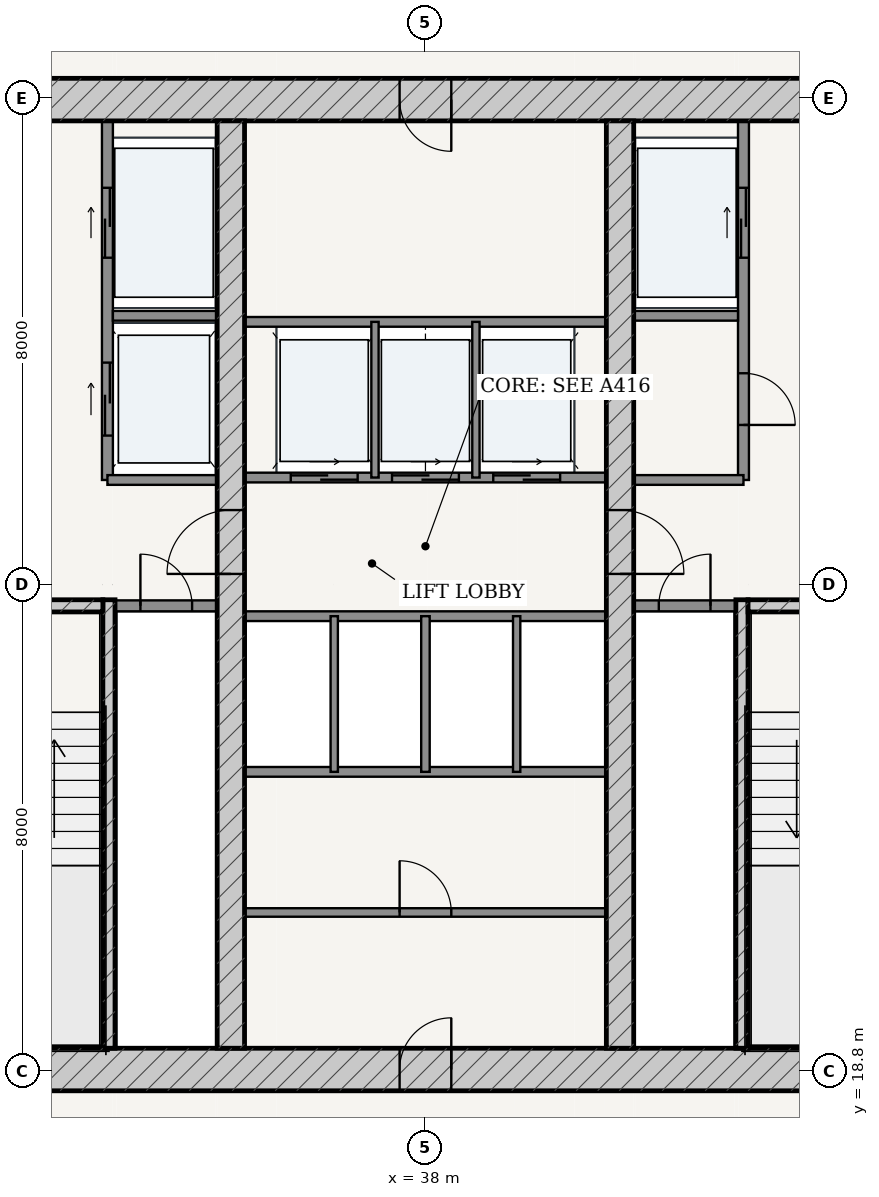
"""IFC4 building model, lengths in metres.
Left out: names, types, materials, properties, quantities, classifications, styles, units other than length and angle.
Written with IfcOpenShell. Run it as: python <this file> out.ifc"""

import sys

from ifc_helpers import new_model, si_unit, direction, frame, frame_2d, origin, place, context, subcontext, project, spatial, rectangle, extrude, source, transform, mapped, element, fill, save


model = new_model("IFC4")
c1 = context("Model", 3, precision=1e-05, world=origin(), true_north=direction((-0.2419218956, 0.970295726276)))
c2 = subcontext(c1, "Body", "Model", "MODEL_VIEW")
j1 = project(units=[si_unit("LENGTHUNIT", "METRE"), si_unit("PLANEANGLEUNIT", "RADIAN")], contexts=[c1])
p1 = place(None, origin())
s1 = spatial("IfcSite", under=j1, at=p1, CompositionType="ELEMENT")
p2 = place(p1, origin())
s2 = spatial("IfcBuilding", under=s1, at=p2, CompositionType="ELEMENT")
p3 = place(p2, frame((0.0, 0.0, 97.8)))
s3 = spatial("IfcBuildingStorey", under=s2, at=p3, CompositionType="ELEMENT", Elevation=97.8)
p4 = place(p3, frame((28.675, 18.825, 0.0), z_axis=(0.0, 0.0, 1.0), x_axis=(1.0, 0.0, 0.0)))
e1 = element("IfcWall", 1, at=p4, inside=s3, PredefinedType="SHEAR", context=c2, shape_type="SweptSolid", body=[
    extrude(rectangle(XDim=18.65, YDim=0.7, at=frame_2d((9.325, 0.0))), origin(), (0.0, 0.0, 1.0), 3.325),
])
p5 = place(p4, frame((8.9, 0.0, 0.0)))
e2 = element("IfcOpeningElement", 2, at=p5, cuts=e1, PredefinedType="OPENING", context=c2, shape_type="SweptSolid", body=[
    extrude(rectangle(XDim=0.85, YDim=2.1, at=frame_2d((0.425, 1.05))), frame((0.0, 0.36, 0.0), z_axis=(0.0, -1.0, 0.0), x_axis=(1.0, 0.0, 0.0)), (0.0, 0.0, 1.0), 0.72),
])
p6 = place(p3, frame((28.675, 34.775, 0.0), z_axis=(0.0, 0.0, 1.0), x_axis=(1.0, 0.0, 0.0)))
e3 = element("IfcWall", 3, at=p6, inside=s3, PredefinedType="SHEAR", context=c2, shape_type="SweptSolid", body=[
    extrude(rectangle(XDim=18.65, YDim=0.7, at=frame_2d((9.325, 0.0))), origin(), (0.0, 0.0, 1.0), 3.325),
])
p7 = place(p6, frame((8.9, 0.0, 0.0)))
e4 = element("IfcOpeningElement", 4, at=p7, cuts=e3, PredefinedType="OPENING", context=c2, shape_type="SweptSolid", body=[
    extrude(rectangle(XDim=0.85, YDim=2.1, at=frame_2d((0.425, 1.05))), frame((0.0, 0.36, 0.0), z_axis=(0.0, -1.0, 0.0), x_axis=(1.0, 0.0, 0.0)), (0.0, 0.0, 1.0), 0.72),
])
p8 = place(p3, frame((32.795, 19.175, 0.0), z_axis=(0.0, 0.0, 1.0), x_axis=(0.0, 1.0, 0.0)))
e5 = element("IfcWall", 5, at=p8, inside=s3, PredefinedType="SOLIDWALL", context=c2, shape_type="SweptSolid", body=[
    extrude(rectangle(XDim=7.375, YDim=0.2, at=frame_2d((3.688, 0.0))), origin(), (0.0, 0.0, 1.0), 3.325),
])
p9 = place(p3, frame((29.375, 26.45, 0.0), z_axis=(0.0, 0.0, 1.0), x_axis=(1.0, 0.0, 0.0)))
e6 = element("IfcWall", 6, at=p9, inside=s3, PredefinedType="SOLIDWALL", context=c2, shape_type="SweptSolid", body=[
    extrude(rectangle(XDim=3.32, YDim=0.2, at=frame_2d((1.66, 0.0))), origin(), (0.0, 0.0, 1.0), 3.325),
])
p10 = place(p9, frame((1.185, 0.0, 0.0)))
e7 = element("IfcOpeningElement", 7, at=p10, cuts=e6, PredefinedType="OPENING", context=c2, shape_type="SweptSolid", body=[
    extrude(rectangle(XDim=0.95, YDim=2.15, at=frame_2d((0.475, 1.075))), frame((0.0, 0.11, 0.0), z_axis=(0.0, -1.0, 0.0), x_axis=(1.0, 0.0, 0.0)), (0.0, 0.0, 1.0), 0.22),
])
p11 = place(p3, frame((43.205, 19.175, 0.0), z_axis=(0.0, 0.0, 1.0), x_axis=(0.0, 1.0, 0.0)))
e8 = element("IfcWall", 8, at=p11, inside=s3, PredefinedType="SOLIDWALL", context=c2, shape_type="SweptSolid", body=[
    extrude(rectangle(XDim=7.375, YDim=0.2, at=frame_2d((3.688, 0.0))), origin(), (0.0, 0.0, 1.0), 3.325),
])
p12 = place(p3, frame((43.305, 26.45, 0.0), z_axis=(0.0, 0.0, 1.0), x_axis=(1.0, 0.0, 0.0)))
e9 = element("IfcWall", 9, at=p12, inside=s3, PredefinedType="SOLIDWALL", context=c2, shape_type="SweptSolid", body=[
    extrude(rectangle(XDim=3.32, YDim=0.2, at=frame_2d((1.66, 0.0))), origin(), (0.0, 0.0, 1.0), 3.325),
])
p13 = place(p12, frame((1.185, 0.0, 0.0)))
e10 = element("IfcOpeningElement", 10, at=p13, cuts=e9, PredefinedType="OPENING", context=c2, shape_type="SweptSolid", body=[
    extrude(rectangle(XDim=0.95, YDim=2.15, at=frame_2d((0.475, 1.075))), frame((0.0, 0.11, 0.0), z_axis=(0.0, -1.0, 0.0), x_axis=(1.0, 0.0, 0.0)), (0.0, 0.0, 1.0), 0.22),
])
p14 = place(p3, frame((34.8, 19.175, 0.0), z_axis=(0.0, 0.0, 1.0), x_axis=(0.0, 1.0, 0.0)))
e11 = element("IfcWall", 11, at=p14, inside=s3, PredefinedType="SHEAR", context=c2, shape_type="SweptSolid", body=[
    extrude(rectangle(XDim=15.25, YDim=0.45, at=frame_2d((7.625, 0.0))), origin(), (0.0, 0.0, 1.0), 3.325),
])
p15 = place(p14, frame((7.8, 0.0, 0.0)))
e12 = element("IfcOpeningElement", 12, at=p15, cuts=e11, PredefinedType="OPENING", context=c2, shape_type="SweptSolid", body=[
    extrude(rectangle(XDim=1.05, YDim=2.15, at=frame_2d((0.525, 1.075))), frame((0.0, 0.235, 0.0), z_axis=(0.0, -1.0, 0.0), x_axis=(1.0, 0.0, 0.0)), (0.0, 0.0, 1.0), 0.47),
])
p16 = place(p3, frame((41.2, 19.175, 0.0), z_axis=(0.0, 0.0, 1.0), x_axis=(0.0, 1.0, 0.0)))
e13 = element("IfcWall", 13, at=p16, inside=s3, PredefinedType="SHEAR", context=c2, shape_type="SweptSolid", body=[
    extrude(rectangle(XDim=15.25, YDim=0.45, at=frame_2d((7.625, 0.0))), origin(), (0.0, 0.0, 1.0), 3.325),
])
p17 = place(p16, frame((7.8, 0.0, 0.0)))
e14 = element("IfcOpeningElement", 14, at=p17, cuts=e13, PredefinedType="OPENING", context=c2, shape_type="SweptSolid", body=[
    extrude(rectangle(XDim=1.05, YDim=2.15, at=frame_2d((0.525, 1.075))), frame((0.0, 0.235, 0.0), z_axis=(0.0, -1.0, 0.0), x_axis=(1.0, 0.0, 0.0)), (0.0, 0.0, 1.0), 0.47),
])
p18 = place(p3, frame((32.9, 26.45, 0.0), z_axis=(0.0, 0.0, 1.0), x_axis=(1.0, 0.0, 0.0)))
e15 = element("IfcWall", 15, at=p18, inside=s3, PredefinedType="PARTITIONING", context=c2, shape_type="SweptSolid", body=[
    extrude(rectangle(XDim=1.675, YDim=0.18, at=frame_2d((0.837, 0.0))), origin(), (0.0, 0.0, 1.0), 3.325),
])
p19 = place(p18, frame((0.413, 0.0, 0.0)))
e16 = element("IfcOpeningElement", 16, at=p19, cuts=e15, PredefinedType="OPENING", context=c2, shape_type="SweptSolid", body=[
    extrude(rectangle(XDim=0.85, YDim=2.1, at=frame_2d((0.425, 1.05))), frame((0.0, 0.1, 0.0), z_axis=(0.0, -1.0, 0.0), x_axis=(1.0, 0.0, 0.0)), (0.0, 0.0, 1.0), 0.2),
])
p20 = place(p3, frame((41.425, 26.45, 0.0), z_axis=(0.0, 0.0, 1.0), x_axis=(1.0, 0.0, 0.0)))
e17 = element("IfcWall", 17, at=p20, inside=s3, PredefinedType="PARTITIONING", context=c2, shape_type="SweptSolid", body=[
    extrude(rectangle(XDim=1.675, YDim=0.18, at=frame_2d((0.837, 0.0))), origin(), (0.0, 0.0, 1.0), 3.325),
])
p21 = place(p20, frame((0.413, 0.0, 0.0)))
e18 = element("IfcOpeningElement", 18, at=p21, cuts=e17, PredefinedType="OPENING", context=c2, shape_type="SweptSolid", body=[
    extrude(rectangle(XDim=0.85, YDim=2.1, at=frame_2d((0.425, 1.05))), frame((0.0, 0.1, 0.0), z_axis=(0.0, -1.0, 0.0), x_axis=(1.0, 0.0, 0.0)), (0.0, 0.0, 1.0), 0.2),
])
p22 = place(p3, frame((32.77, 28.52, 0.0), z_axis=(0.0, 0.0, 1.0), x_axis=(0.0, 1.0, 0.0)))
e19 = element("IfcWall", 19, at=p22, inside=s3, PredefinedType="PARTITIONING", context=c2, shape_type="SweptSolid", body=[
    extrude(rectangle(XDim=5.905, YDim=0.18, at=frame_2d((2.953, 0.0))), origin(), (0.0, 0.0, 1.0), 3.325),
])
p23 = place(p22, frame((3.655, 0.0, 0.0)))
e20 = element("IfcOpeningElement", 20, at=p23, cuts=e19, PredefinedType="OPENING", context=c2, shape_type="SweptSolid", body=[
    extrude(rectangle(XDim=1.15, YDim=2.2, at=frame_2d((0.575, 1.1))), frame((0.0, 0.1, 0.0), z_axis=(0.0, -1.0, 0.0), x_axis=(1.0, 0.0, 0.0)), (0.0, 0.0, 1.0), 0.2),
])
p24 = place(p22, frame((0.73, 0.0, 0.0)))
e21 = element("IfcOpeningElement", 21, at=p24, cuts=e19, PredefinedType="OPENING", context=c2, shape_type="SweptSolid", body=[
    extrude(rectangle(XDim=1.2, YDim=2.25, at=frame_2d((0.6, 1.125))), frame((0.0, 0.1, 0.0), z_axis=(0.0, -1.0, 0.0), x_axis=(1.0, 0.0, 0.0)), (0.0, 0.0, 1.0), 0.2),
])
p25 = place(p3, frame((32.86, 31.22, 0.0), z_axis=(0.0, 0.0, 1.0), x_axis=(1.0, 0.0, 0.0)))
e22 = element("IfcWall", 22, at=p25, inside=s3, PredefinedType="PARTITIONING", context=c2, shape_type="SweptSolid", body=[
    extrude(rectangle(XDim=1.715, YDim=0.16, at=frame_2d((0.857, 0.0))), origin(), (0.0, 0.0, 1.0), 3.325),
])
p26 = place(p3, frame((32.77, 28.52, 0.0), z_axis=(0.0, 0.0, 1.0), x_axis=(1.0, 0.0, 0.0)))
e23 = element("IfcWall", 23, at=p26, inside=s3, PredefinedType="PARTITIONING", context=c2, shape_type="SweptSolid", body=[
    extrude(rectangle(XDim=1.805, YDim=0.16, at=frame_2d((0.902, 0.0))), origin(), (0.0, 0.0, 1.0), 3.325),
])
p27 = place(p3, frame((43.23, 28.52, 0.0), z_axis=(0.0, 0.0, 1.0), x_axis=(0.0, 1.0, 0.0)))
e24 = element("IfcWall", 24, at=p27, inside=s3, PredefinedType="PARTITIONING", context=c2, shape_type="SweptSolid", body=[
    extrude(rectangle(XDim=5.905, YDim=0.18, at=frame_2d((2.953, 0.0))), origin(), (0.0, 0.0, 1.0), 3.325),
])
p28 = place(p27, frame((0.905, 0.0, 0.0)))
e25 = element("IfcOpeningElement", 25, at=p28, cuts=e24, PredefinedType="OPENING", context=c2, shape_type="SweptSolid", body=[
    extrude(rectangle(XDim=0.85, YDim=2.1, at=frame_2d((0.425, 1.05))), frame((0.0, 0.1, 0.0), z_axis=(0.0, -1.0, 0.0), x_axis=(1.0, 0.0, 0.0)), (0.0, 0.0, 1.0), 0.2),
])
p29 = place(p27, frame((3.655, 0.0, 0.0)))
e26 = element("IfcOpeningElement", 26, at=p29, cuts=e24, PredefinedType="OPENING", context=c2, shape_type="SweptSolid", body=[
    extrude(rectangle(XDim=1.15, YDim=2.2, at=frame_2d((0.575, 1.1))), frame((0.0, 0.1, 0.0), z_axis=(0.0, -1.0, 0.0), x_axis=(1.0, 0.0, 0.0)), (0.0, 0.0, 1.0), 0.2),
])
p30 = place(p3, frame((41.425, 31.22, 0.0), z_axis=(0.0, 0.0, 1.0), x_axis=(1.0, 0.0, 0.0)))
e27 = element("IfcWall", 27, at=p30, inside=s3, PredefinedType="PARTITIONING", context=c2, shape_type="SweptSolid", body=[
    extrude(rectangle(XDim=1.715, YDim=0.16, at=frame_2d((0.857, 0.0))), origin(), (0.0, 0.0, 1.0), 3.325),
])
p31 = place(p3, frame((41.425, 28.52, 0.0), z_axis=(0.0, 0.0, 1.0), x_axis=(1.0, 0.0, 0.0)))
e28 = element("IfcWall", 28, at=p31, inside=s3, PredefinedType="PARTITIONING", context=c2, shape_type="SweptSolid", body=[
    extrude(rectangle(XDim=1.805, YDim=0.16, at=frame_2d((0.902, 0.0))), origin(), (0.0, 0.0, 1.0), 3.325),
])
p32 = place(p3, frame((35.025, 28.56, 0.0), z_axis=(0.0, 0.0, 1.0), x_axis=(1.0, 0.0, 0.0)))
e29 = element("IfcWall", 29, at=p32, inside=s3, PredefinedType="PARTITIONING", context=c2, shape_type="SweptSolid", body=[
    extrude(rectangle(XDim=5.95, YDim=0.16, at=frame_2d((2.975, 0.0))), origin(), (0.0, 0.0, 1.0), 3.325),
])
p33 = place(p32, frame((0.76, 0.0, 0.0)))
e30 = element("IfcOpeningElement", 30, at=p33, cuts=e29, PredefinedType="OPENING", context=c2, shape_type="SweptSolid", body=[
    extrude(rectangle(XDim=1.1, YDim=2.2, at=frame_2d((0.55, 1.1))), frame((0.0, 0.09, 0.0), z_axis=(0.0, -1.0, 0.0), x_axis=(1.0, 0.0, 0.0)), (0.0, 0.0, 1.0), 0.18),
])
p34 = place(p32, frame((2.425, 0.0, 0.0)))
e31 = element("IfcOpeningElement", 31, at=p34, cuts=e29, PredefinedType="OPENING", context=c2, shape_type="SweptSolid", body=[
    extrude(rectangle(XDim=1.1, YDim=2.2, at=frame_2d((0.55, 1.1))), frame((0.0, 0.09, 0.0), z_axis=(0.0, -1.0, 0.0), x_axis=(1.0, 0.0, 0.0)), (0.0, 0.0, 1.0), 0.18),
])
p35 = place(p32, frame((4.09, 0.0, 0.0)))
e32 = element("IfcOpeningElement", 32, at=p35, cuts=e29, PredefinedType="OPENING", context=c2, shape_type="SweptSolid", body=[
    extrude(rectangle(XDim=1.1, YDim=2.2, at=frame_2d((0.55, 1.1))), frame((0.0, 0.09, 0.0), z_axis=(0.0, -1.0, 0.0), x_axis=(1.0, 0.0, 0.0)), (0.0, 0.0, 1.0), 0.18),
])
p36 = place(p3, frame((35.025, 31.12, 0.0), z_axis=(0.0, 0.0, 1.0), x_axis=(1.0, 0.0, 0.0)))
e33 = element("IfcWall", 33, at=p36, inside=s3, PredefinedType="PARTITIONING", context=c2, shape_type="SweptSolid", body=[
    extrude(rectangle(XDim=5.95, YDim=0.16, at=frame_2d((2.975, 0.0))), origin(), (0.0, 0.0, 1.0), 3.325),
])
for number, where, z_axis, x_axis in (
    (34, (37.17, 28.56, 0.0), (0.0, 0.0, 1.0), (0.0, 1.0, 0.0)),
    (35, (38.83, 28.56, 0.0), (0.0, 0.0, 1.0), (0.0, 1.0, 0.0)),
):
    element("IfcWall", number, at=place(p3, frame(where, z_axis=z_axis, x_axis=x_axis)), inside=s3, PredefinedType="PARTITIONING", context=c2, shape_type="SweptSolid", body=[
        extrude(rectangle(XDim=2.56, YDim=0.12, at=frame_2d((1.28, 0.0))), origin(), (0.0, 0.0, 1.0), 3.325),
    ])
for number, where, z_axis, x_axis in (
    (36, (35.025, 26.28, 0.0), (0.0, 0.0, 1.0), (1.0, 0.0, 0.0)),
    (37, (35.025, 23.72, 0.0), (0.0, 0.0, 1.0), (1.0, 0.0, 0.0)),
):
    element("IfcWall", number, at=place(p3, frame(where, z_axis=z_axis, x_axis=x_axis)), inside=s3, PredefinedType="PARTITIONING", context=c2, shape_type="SweptSolid", body=[
        extrude(rectangle(XDim=5.95, YDim=0.16, at=frame_2d((2.975, 0.0))), origin(), (0.0, 0.0, 1.0), 3.325),
    ])
p37 = place(p3, frame((36.5, 23.72, 0.0), z_axis=(0.0, 0.0, 1.0), x_axis=(0.0, 1.0, 0.0)))
e38 = element("IfcWall", 38, at=p37, inside=s3, PredefinedType="PARTITIONING", context=c2, shape_type="SweptSolid", body=[
    extrude(rectangle(XDim=2.56, YDim=0.12, at=frame_2d((1.28, 0.0))), origin(), (0.0, 0.0, 1.0), 3.325),
])
p38 = place(p3, frame((38.0, 23.72, 0.0), z_axis=(0.0, 0.0, 1.0), x_axis=(0.0, 1.0, 0.0)))
e39 = element("IfcWall", 39, at=p38, inside=s3, PredefinedType="PARTITIONING", context=c2, shape_type="SweptSolid", body=[
    extrude(rectangle(XDim=2.56, YDim=0.14, at=frame_2d((1.28, 0.0))), origin(), (0.0, 0.0, 1.0), 3.325),
])
p39 = place(p3, frame((39.5, 23.72, 0.0), z_axis=(0.0, 0.0, 1.0), x_axis=(0.0, 1.0, 0.0)))
e40 = element("IfcWall", 40, at=p39, inside=s3, PredefinedType="PARTITIONING", context=c2, shape_type="SweptSolid", body=[
    extrude(rectangle(XDim=2.56, YDim=0.12, at=frame_2d((1.28, 0.0))), origin(), (0.0, 0.0, 1.0), 3.325),
])
p40 = place(p3, frame((35.025, 21.407, 0.0), z_axis=(0.0, 0.0, 1.0), x_axis=(1.0, 0.0, 0.0)))
e41 = element("IfcWall", 41, at=p40, inside=s3, PredefinedType="PARTITIONING", context=c2, shape_type="SweptSolid", body=[
    extrude(rectangle(XDim=5.95, YDim=0.14, at=frame_2d((2.975, 0.0))), origin(), (0.0, 0.0, 1.0), 3.325),
])
p41 = place(p40, frame((2.55, 0.0, 0.0)))
e42 = element("IfcOpeningElement", 42, at=p41, cuts=e41, PredefinedType="OPENING", context=c2, shape_type="SweptSolid", body=[
    extrude(rectangle(XDim=0.85, YDim=2.1, at=frame_2d((0.425, 1.05))), frame((0.0, 0.08, 0.0), z_axis=(0.0, -1.0, 0.0), x_axis=(1.0, 0.0, 0.0)), (0.0, 0.0, 1.0), 0.16),
])
m1 = source(origin(), c2, "Body", "SweptSolid", [
    extrude(rectangle(XDim=1.05, YDim=2.15, at=frame_2d((0.525, 1.075))), frame((0.0, 0.025, 0.0), z_axis=(0.0, -1.0, 0.0), x_axis=(1.0, 0.0, 0.0)), (0.0, 0.0, 1.0), 0.05),
])
p42 = place(p15, origin())
e43 = element("IfcDoor", 43, at=p42, inside=s3, OperationType="SINGLE_SWING_LEFT", PredefinedType="DOOR", context=c2, shape_type="MappedRepresentation", body=[
    mapped(m1, transform((0.0, 0.0, 0.0), scale=1.0)),
])
fill(e12, e43)
p43 = place(p17, frame((1.05, 0.0, 0.0), z_axis=(0.0, 0.0, 1.0), x_axis=(-1.0, 0.0, 0.0)))
e44 = element("IfcDoor", 44, at=p43, inside=s3, OperationType="SINGLE_SWING_RIGHT", PredefinedType="DOOR", context=c2, shape_type="MappedRepresentation", body=[
    mapped(m1, transform((0.0, 0.0, 0.0), scale=1.0)),
])
fill(e14, e44)
m2 = source(origin(), c2, "Body", "SweptSolid", [
    extrude(rectangle(XDim=0.85, YDim=2.1, at=frame_2d((0.425, 1.05))), frame((0.0, 0.025, 0.0), z_axis=(0.0, -1.0, 0.0), x_axis=(1.0, 0.0, 0.0)), (0.0, 0.0, 1.0), 0.05),
])
p44 = place(p19, origin())
e45 = element("IfcDoor", 45, at=p44, inside=s3, OperationType="SINGLE_SWING_LEFT", PredefinedType="DOOR", context=c2, shape_type="MappedRepresentation", body=[
    mapped(m2, transform((0.0, 0.0, 0.0), scale=1.0)),
])
fill(e16, e45)
p45 = place(p21, origin())
e46 = element("IfcDoor", 46, at=p45, inside=s3, OperationType="SINGLE_SWING_RIGHT", PredefinedType="DOOR", context=c2, shape_type="MappedRepresentation", body=[
    mapped(m2, transform((0.0, 0.0, 0.0), scale=1.0)),
])
fill(e18, e46)
p46 = place(p28, frame((0.85, 0.0, 0.0), z_axis=(0.0, 0.0, 1.0), x_axis=(-1.0, 0.0, 0.0)))
e47 = element("IfcDoor", 47, at=p46, inside=s3, OperationType="SINGLE_SWING_RIGHT", PredefinedType="DOOR", context=c2, shape_type="MappedRepresentation", body=[
    mapped(m2, transform((0.0, 0.0, 0.0), scale=1.0)),
])
fill(e25, e47)
p47 = place(p7, frame((0.85, 0.0, 0.0), z_axis=(0.0, 0.0, 1.0), x_axis=(-1.0, 0.0, 0.0)))
e48 = element("IfcDoor", 48, at=p47, inside=s3, OperationType="SINGLE_SWING_LEFT", PredefinedType="DOOR", context=c2, shape_type="MappedRepresentation", body=[
    mapped(m2, transform((0.0, 0.0, 0.0), scale=1.0)),
])
fill(e4, e48)
p48 = place(p5, origin())
e49 = element("IfcDoor", 49, at=p48, inside=s3, OperationType="SINGLE_SWING_RIGHT", PredefinedType="DOOR", context=c2, shape_type="MappedRepresentation", body=[
    mapped(m2, transform((0.0, 0.0, 0.0), scale=1.0)),
])
fill(e2, e49)
p49 = place(p41, origin())
e50 = element("IfcDoor", 50, at=p49, inside=s3, OperationType="SINGLE_SWING_LEFT", PredefinedType="DOOR", context=c2, shape_type="MappedRepresentation", body=[
    mapped(m2, transform((0.0, 0.0, 0.0), scale=1.0)),
])
fill(e42, e50)
m3 = source(origin(), c2, "Body", "SweptSolid", [
    extrude(rectangle(XDim=1.15, YDim=2.2, at=frame_2d((0.575, 1.1))), frame((0.0, 0.025, 0.0), z_axis=(0.0, -1.0, 0.0), x_axis=(1.0, 0.0, 0.0)), (0.0, 0.0, 1.0), 0.05),
])
p50 = place(p23, origin())
e51 = element("IfcDoor", 51, at=p50, inside=s3, OperationType="DOUBLE_DOOR_SLIDING", PredefinedType="DOOR", context=c2, shape_type="MappedRepresentation", body=[
    mapped(m3, transform((0.0, 0.0, 0.0), scale=1.0)),
])
fill(e20, e51)
p51 = place(p29, origin())
e52 = element("IfcDoor", 52, at=p51, inside=s3, OperationType="DOUBLE_DOOR_SLIDING", PredefinedType="DOOR", context=c2, shape_type="MappedRepresentation", body=[
    mapped(m3, transform((0.0, 0.0, 0.0), scale=1.0)),
])
fill(e26, e52)
m4 = source(origin(), c2, "Body", "SweptSolid", [
    extrude(rectangle(XDim=1.2, YDim=2.25, at=frame_2d((0.6, 1.125))), frame((0.0, 0.025, 0.0), z_axis=(0.0, -1.0, 0.0), x_axis=(1.0, 0.0, 0.0)), (0.0, 0.0, 1.0), 0.05),
])
p52 = place(p24, origin())
e53 = element("IfcDoor", 53, at=p52, inside=s3, OperationType="DOUBLE_DOOR_SLIDING", PredefinedType="DOOR", context=c2, shape_type="MappedRepresentation", body=[
    mapped(m4, transform((0.0, 0.0, 0.0), scale=1.0)),
])
fill(e21, e53)
m5 = source(origin(), c2, "Body", "SweptSolid", [
    extrude(rectangle(XDim=1.1, YDim=2.2, at=frame_2d((0.55, 1.1))), frame((0.0, 0.025, 0.0), z_axis=(0.0, -1.0, 0.0), x_axis=(1.0, 0.0, 0.0)), (0.0, 0.0, 1.0), 0.05),
])
p53 = place(p33, origin())
e54 = element("IfcDoor", 54, at=p53, inside=s3, OperationType="DOUBLE_DOOR_SLIDING", PredefinedType="DOOR", context=c2, shape_type="MappedRepresentation", body=[
    mapped(m5, transform((0.0, 0.0, 0.0), scale=1.0)),
])
fill(e30, e54)
p54 = place(p34, origin())
e55 = element("IfcDoor", 55, at=p54, inside=s3, OperationType="DOUBLE_DOOR_SLIDING", PredefinedType="DOOR", context=c2, shape_type="MappedRepresentation", body=[
    mapped(m5, transform((0.0, 0.0, 0.0), scale=1.0)),
])
fill(e31, e55)
p55 = place(p35, origin())
e56 = element("IfcDoor", 56, at=p55, inside=s3, OperationType="DOUBLE_DOOR_SLIDING", PredefinedType="DOOR", context=c2, shape_type="MappedRepresentation", body=[
    mapped(m5, transform((0.0, 0.0, 0.0), scale=1.0)),
])
fill(e32, e56)
save(model, sys.argv[1])
